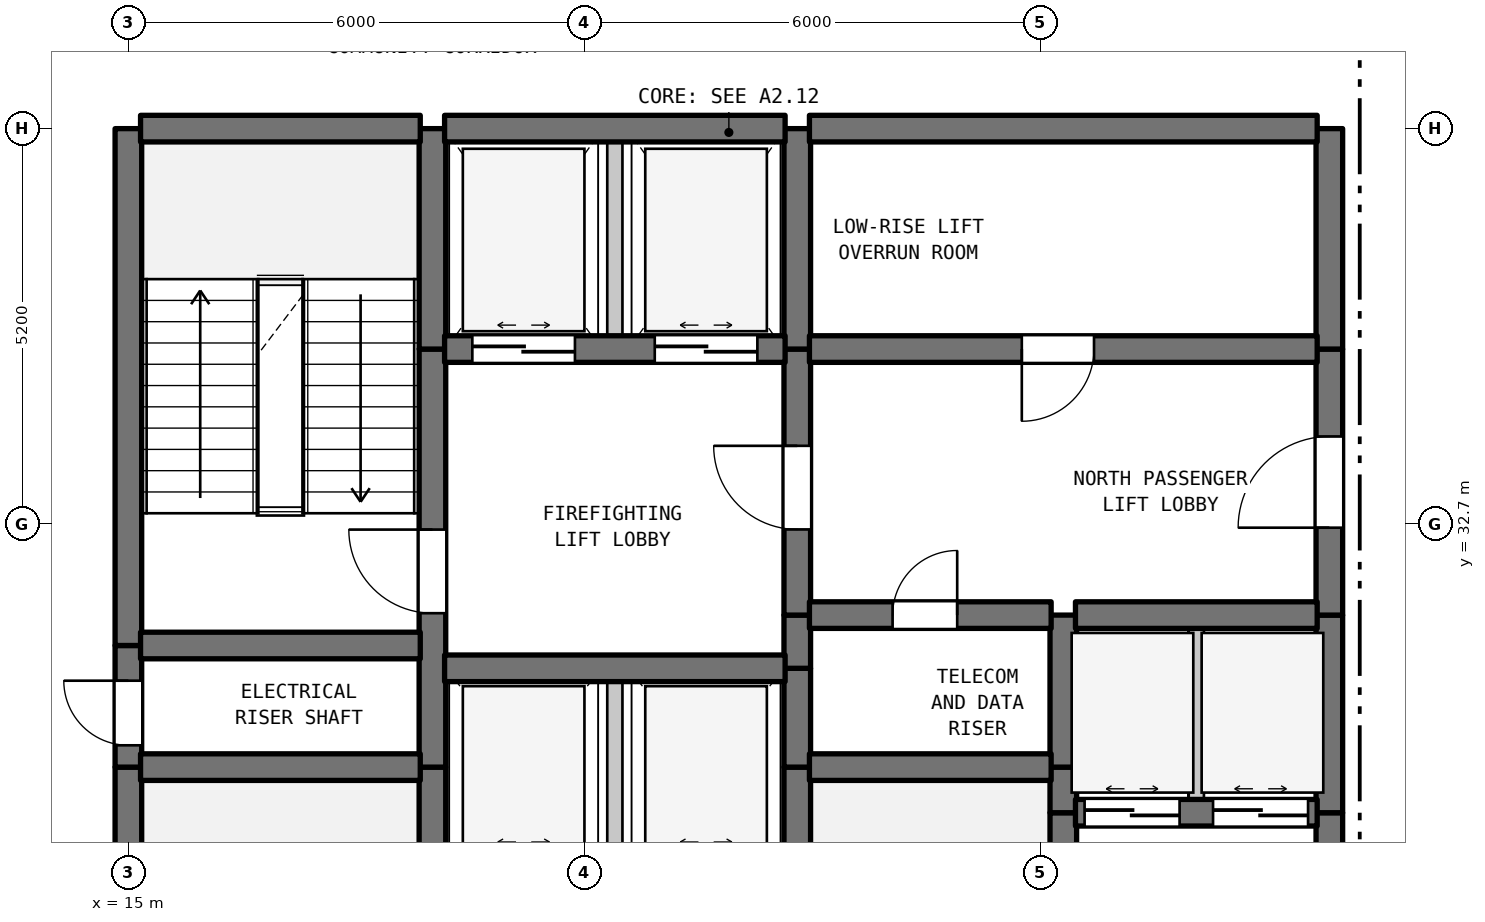
"""IFC4 building model, lengths in metres.
Left out: names, types, materials, properties, quantities, classifications, styles, units other than length and angle.
Written with IfcOpenShell. Run it as: python <this file> out.ifc"""

import sys

from ifc_helpers import new_model, si_unit, direction, frame, frame_2d, origin, place, context, subcontext, project, spatial, rectangle, extrude, element, fill, save


model = new_model("IFC4")
c1 = context("Model", 3, precision=1e-05, world=origin(), true_north=direction((0.0, 1.0)))
c2 = subcontext(c1, "Body", "Model", "MODEL_VIEW")
j1 = project(units=[si_unit("LENGTHUNIT", "METRE"), si_unit("PLANEANGLEUNIT", "RADIAN")], contexts=[c1])
p1 = place(None, origin())
s1 = spatial("IfcSite", under=j1, at=p1, CompositionType="ELEMENT")
p2 = place(p1, origin())
s2 = spatial("IfcBuilding", under=s1, at=p2, CompositionType="ELEMENT")
p3 = place(p2, frame((0.0, 0.0, 125.3)))
s3 = spatial("IfcBuildingStorey", under=s2, at=p3, CompositionType="ELEMENT", Elevation=125.3)
p4 = place(p3, frame((15.0, 22.7, 0.0), z_axis=(0.0, 0.0, 1.0), x_axis=(0.0, 1.0, 0.0)))
e1 = element("IfcWall", 1, at=p4, inside=s3, PredefinedType="SHEAR", context=c2, shape_type="SweptSolid", body=[
    extrude(rectangle(XDim=6.8, YDim=0.35, at=frame_2d((3.4, 0.0))), origin(), (0.0, 0.0, 1.0), 4.185),
])
p5 = place(p3, frame((15.0, 29.5, 0.0), z_axis=(0.0, 0.0, 1.0), x_axis=(0.0, 1.0, 0.0)))
e2 = element("IfcWall", 2, at=p5, inside=s3, PredefinedType="SHEAR", context=c2, shape_type="SweptSolid", body=[
    extrude(rectangle(XDim=1.6, YDim=0.35, at=frame_2d((0.8, 0.0))), origin(), (0.0, 0.0, 1.0), 4.185),
])
p6 = place(p5, frame((0.287, 0.0, 0.0)))
e3 = element("IfcOpeningElement", 3, at=p6, cuts=e2, PredefinedType="OPENING", context=c2, shape_type="SweptSolid", body=[
    extrude(rectangle(XDim=0.85, YDim=2.1, at=frame_2d((0.425, 1.05))), frame((0.0, 0.185, 0.0), z_axis=(0.0, -1.0, 0.0), x_axis=(1.0, 0.0, 0.0)), (0.0, 0.0, 1.0), 0.37),
])
p7 = place(p3, frame((15.0, 31.1, 0.0), z_axis=(0.0, 0.0, 1.0), x_axis=(0.0, 1.0, 0.0)))
e4 = element("IfcWall", 4, at=p7, inside=s3, PredefinedType="SHEAR", context=c2, shape_type="SweptSolid", body=[
    extrude(rectangle(XDim=6.8, YDim=0.35, at=frame_2d((3.4, 0.0))), origin(), (0.0, 0.0, 1.0), 4.185),
])
p8 = place(p3, frame((19.0, 28.2, 0.0), z_axis=(0.0, 0.0, 1.0), x_axis=(0.0, 1.0, 0.0)))
e5 = element("IfcWall", 5, at=p8, inside=s3, PredefinedType="SHEAR", context=c2, shape_type="SweptSolid", body=[
    extrude(rectangle(XDim=1.3, YDim=0.35, at=frame_2d((0.65, 0.0))), origin(), (0.0, 0.0, 1.0), 4.185),
])
p9 = place(p3, frame((19.0, 29.5, 0.0), z_axis=(0.0, 0.0, 1.0), x_axis=(0.0, 1.0, 0.0)))
e6 = element("IfcWall", 6, at=p9, inside=s3, PredefinedType="SHEAR", context=c2, shape_type="SweptSolid", body=[
    extrude(rectangle(XDim=5.5, YDim=0.35, at=frame_2d((2.75, 0.0))), origin(), (0.0, 0.0, 1.0), 4.185),
])
p10 = place(p9, frame((2.025, 0.0, 0.0)))
e7 = element("IfcOpeningElement", 7, at=p10, cuts=e6, PredefinedType="OPENING", context=c2, shape_type="SweptSolid", body=[
    extrude(rectangle(XDim=1.1, YDim=2.15, at=frame_2d((0.55, 1.075))), frame((0.0, 0.185, 0.0), z_axis=(0.0, -1.0, 0.0), x_axis=(1.0, 0.0, 0.0)), (0.0, 0.0, 1.0), 0.37),
])
p11 = place(p3, frame((19.0, 35.0, 0.0), z_axis=(0.0, 0.0, 1.0), x_axis=(0.0, 1.0, 0.0)))
e8 = element("IfcWall", 8, at=p11, inside=s3, PredefinedType="SHEAR", context=c2, shape_type="SweptSolid", body=[
    extrude(rectangle(XDim=2.9, YDim=0.35, at=frame_2d((1.45, 0.0))), origin(), (0.0, 0.0, 1.0), 4.185),
])
p12 = place(p3, frame((21.4, 28.2, 0.0), z_axis=(0.0, 0.0, 1.0), x_axis=(0.0, 1.0, 0.0)))
e9 = element("IfcWall", 9, at=p12, inside=s3, PredefinedType="STANDARD", context=c2, shape_type="SweptSolid", body=[
    extrude(rectangle(XDim=2.6, YDim=0.2, at=frame_2d((1.3, 0.0))), origin(), (0.0, 0.0, 1.0), 4.185),
])
p13 = place(p3, frame((21.4, 35.0, 0.0), z_axis=(0.0, 0.0, 1.0), x_axis=(0.0, 1.0, 0.0)))
e10 = element("IfcWall", 10, at=p13, inside=s3, PredefinedType="STANDARD", context=c2, shape_type="SweptSolid", body=[
    extrude(rectangle(XDim=2.9, YDim=0.2, at=frame_2d((1.45, 0.0))), origin(), (0.0, 0.0, 1.0), 4.185),
])
for number, where, z_axis, x_axis in (
    (11, (23.8, 28.2, 0.0), (0.0, 0.0, 1.0), (0.0, 1.0, 0.0)),
    (12, (23.8, 29.5, 0.0), (0.0, 0.0, 1.0), (0.0, 1.0, 0.0)),
):
    element("IfcWall", number, at=place(p3, frame(where, z_axis=z_axis, x_axis=x_axis)), inside=s3, PredefinedType="SHEAR", context=c2, shape_type="SweptSolid", body=[
        extrude(rectangle(XDim=1.3, YDim=0.35, at=frame_2d((0.65, 0.0))), origin(), (0.0, 0.0, 1.0), 4.185),
    ])
p14 = place(p3, frame((23.8, 30.8, 0.0), z_axis=(0.0, 0.0, 1.0), x_axis=(0.0, 1.0, 0.0)))
e13 = element("IfcWall", 13, at=p14, inside=s3, PredefinedType="SHEAR", context=c2, shape_type="SweptSolid", body=[
    extrude(rectangle(XDim=0.7, YDim=0.35, at=frame_2d((0.35, 0.0))), origin(), (0.0, 0.0, 1.0), 4.185),
])
p15 = place(p3, frame((23.8, 31.5, 0.0), z_axis=(0.0, 0.0, 1.0), x_axis=(0.0, 1.0, 0.0)))
e14 = element("IfcWall", 14, at=p15, inside=s3, PredefinedType="SHEAR", context=c2, shape_type="SweptSolid", body=[
    extrude(rectangle(XDim=3.5, YDim=0.35, at=frame_2d((1.75, 0.0))), origin(), (0.0, 0.0, 1.0), 4.185),
])
p16 = place(p15, frame((1.127, 0.0, 0.0)))
e15 = element("IfcOpeningElement", 15, at=p16, cuts=e14, PredefinedType="OPENING", context=c2, shape_type="SweptSolid", body=[
    extrude(rectangle(XDim=1.1, YDim=2.15, at=frame_2d((0.55, 1.075))), frame((0.0, 0.185, 0.0), z_axis=(0.0, -1.0, 0.0), x_axis=(1.0, 0.0, 0.0)), (0.0, 0.0, 1.0), 0.37),
])
p17 = place(p3, frame((23.8, 35.0, 0.0), z_axis=(0.0, 0.0, 1.0), x_axis=(0.0, 1.0, 0.0)))
e16 = element("IfcWall", 16, at=p17, inside=s3, PredefinedType="SHEAR", context=c2, shape_type="SweptSolid", body=[
    extrude(rectangle(XDim=2.9, YDim=0.35, at=frame_2d((1.45, 0.0))), origin(), (0.0, 0.0, 1.0), 4.185),
])
p18 = place(p3, frame((27.3, 25.6, 0.0), z_axis=(0.0, 0.0, 1.0), x_axis=(0.0, 1.0, 0.0)))
e17 = element("IfcWall", 17, at=p18, inside=s3, PredefinedType="SHEAR", context=c2, shape_type="SweptSolid", body=[
    extrude(rectangle(XDim=3.3, YDim=0.35, at=frame_2d((1.65, 0.0))), origin(), (0.0, 0.0, 1.0), 4.185),
])
p19 = place(p3, frame((27.3, 28.9, 0.0), z_axis=(0.0, 0.0, 1.0), x_axis=(0.0, 1.0, 0.0)))
e18 = element("IfcWall", 18, at=p19, inside=s3, PredefinedType="SHEAR", context=c2, shape_type="SweptSolid", body=[
    extrude(rectangle(XDim=0.6, YDim=0.35, at=frame_2d((0.3, 0.0))), origin(), (0.0, 0.0, 1.0), 4.185),
])
p20 = place(p3, frame((27.3, 29.5, 0.0), z_axis=(0.0, 0.0, 1.0), x_axis=(0.0, 1.0, 0.0)))
e19 = element("IfcWall", 19, at=p20, inside=s3, PredefinedType="SHEAR", context=c2, shape_type="SweptSolid", body=[
    extrude(rectangle(XDim=2.0, YDim=0.35, at=frame_2d((1.0, 0.0))), origin(), (0.0, 0.0, 1.0), 4.185),
])
p21 = place(p3, frame((29.05, 28.9, 0.0), z_axis=(0.0, 0.0, 1.0), x_axis=(0.0, 1.0, 0.0)))
e20 = element("IfcWall", 20, at=p21, inside=s3, PredefinedType="STANDARD", context=c2, shape_type="SweptSolid", body=[
    extrude(rectangle(XDim=2.6, YDim=0.2, at=frame_2d((1.3, 0.0))), origin(), (0.0, 0.0, 1.0), 4.185),
])
p22 = place(p3, frame((30.8, 25.6, 0.0), z_axis=(0.0, 0.0, 1.0), x_axis=(0.0, 1.0, 0.0)))
e21 = element("IfcWall", 21, at=p22, inside=s3, PredefinedType="SHEAR", context=c2, shape_type="SweptSolid", body=[
    extrude(rectangle(XDim=3.3, YDim=0.35, at=frame_2d((1.65, 0.0))), origin(), (0.0, 0.0, 1.0), 4.185),
])
p23 = place(p22, frame((0.978, 0.0, 0.0)))
e22 = element("IfcOpeningElement", 22, at=p23, cuts=e21, PredefinedType="OPENING", context=c2, shape_type="SweptSolid", body=[
    extrude(rectangle(XDim=1.2, YDim=2.2, at=frame_2d((0.6, 1.1))), frame((0.0, 0.185, 0.0), z_axis=(0.0, -1.0, 0.0), x_axis=(1.0, 0.0, 0.0)), (0.0, 0.0, 1.0), 0.37),
])
p24 = place(p3, frame((30.8, 28.9, 0.0), z_axis=(0.0, 0.0, 1.0), x_axis=(0.0, 1.0, 0.0)))
e23 = element("IfcWall", 23, at=p24, inside=s3, PredefinedType="SHEAR", context=c2, shape_type="SweptSolid", body=[
    extrude(rectangle(XDim=2.6, YDim=0.35, at=frame_2d((1.3, 0.0))), origin(), (0.0, 0.0, 1.0), 4.185),
])
p25 = place(p3, frame((30.8, 31.5, 0.0), z_axis=(0.0, 0.0, 1.0), x_axis=(0.0, 1.0, 0.0)))
e24 = element("IfcWall", 24, at=p25, inside=s3, PredefinedType="SHEAR", context=c2, shape_type="SweptSolid", body=[
    extrude(rectangle(XDim=3.5, YDim=0.35, at=frame_2d((1.75, 0.0))), origin(), (0.0, 0.0, 1.0), 4.185),
])
p26 = place(p25, frame((1.15, 0.0, 0.0)))
e25 = element("IfcOpeningElement", 25, at=p26, cuts=e24, PredefinedType="OPENING", context=c2, shape_type="SweptSolid", body=[
    extrude(rectangle(XDim=1.2, YDim=2.2, at=frame_2d((0.6, 1.1))), frame((0.0, 0.185, 0.0), z_axis=(0.0, -1.0, 0.0), x_axis=(1.0, 0.0, 0.0)), (0.0, 0.0, 1.0), 0.37),
])
p27 = place(p3, frame((30.8, 35.0, 0.0), z_axis=(0.0, 0.0, 1.0), x_axis=(0.0, 1.0, 0.0)))
e26 = element("IfcWall", 26, at=p27, inside=s3, PredefinedType="SHEAR", context=c2, shape_type="SweptSolid", body=[
    extrude(rectangle(XDim=2.9, YDim=0.35, at=frame_2d((1.45, 0.0))), origin(), (0.0, 0.0, 1.0), 4.185),
])
p28 = place(p3, frame((27.46, 28.9, 0.0), z_axis=(0.0, 0.0, 1.0), x_axis=(1.0, 0.0, 0.0)))
e27 = element("IfcWall", 27, at=p28, inside=s3, PredefinedType="SHEAR", context=c2, shape_type="SweptSolid", body=[
    extrude(rectangle(XDim=3.18, YDim=0.35, at=frame_2d((1.59, 0.0))), origin(), (0.0, 0.0, 1.0), 4.185),
])
p29 = place(p28, frame((0.12, 0.0, 0.0)))
e28 = element("IfcOpeningElement", 28, at=p29, cuts=e27, PredefinedType="OPENING", context=c2, shape_type="SweptSolid", body=[
    extrude(rectangle(XDim=1.25, YDim=2.2, at=frame_2d((0.625, 1.1))), frame((0.0, 0.185, 0.0), z_axis=(0.0, -1.0, 0.0), x_axis=(1.0, 0.0, 0.0)), (0.0, 0.0, 1.0), 0.37),
])
p30 = place(p28, frame((1.81, 0.0, 0.0)))
e29 = element("IfcOpeningElement", 29, at=p30, cuts=e27, PredefinedType="OPENING", context=c2, shape_type="SweptSolid", body=[
    extrude(rectangle(XDim=1.25, YDim=2.2, at=frame_2d((0.625, 1.1))), frame((0.0, 0.185, 0.0), z_axis=(0.0, -1.0, 0.0), x_axis=(1.0, 0.0, 0.0)), (0.0, 0.0, 1.0), 0.37),
])
p31 = place(p3, frame((15.16, 29.5, 0.0), z_axis=(0.0, 0.0, 1.0), x_axis=(1.0, 0.0, 0.0)))
e30 = element("IfcWall", 30, at=p31, inside=s3, PredefinedType="SHEAR", context=c2, shape_type="SweptSolid", body=[
    extrude(rectangle(XDim=3.68, YDim=0.35, at=frame_2d((1.84, 0.0))), origin(), (0.0, 0.0, 1.0), 4.185),
])
p32 = place(p3, frame((23.96, 29.5, 0.0), z_axis=(0.0, 0.0, 1.0), x_axis=(1.0, 0.0, 0.0)))
e31 = element("IfcWall", 31, at=p32, inside=s3, PredefinedType="SHEAR", context=c2, shape_type="SweptSolid", body=[
    extrude(rectangle(XDim=3.18, YDim=0.35, at=frame_2d((1.59, 0.0))), origin(), (0.0, 0.0, 1.0), 4.185),
])
p33 = place(p3, frame((19.16, 30.8, 0.0), z_axis=(0.0, 0.0, 1.0), x_axis=(1.0, 0.0, 0.0)))
e32 = element("IfcWall", 32, at=p33, inside=s3, PredefinedType="SHEAR", context=c2, shape_type="SweptSolid", body=[
    extrude(rectangle(XDim=4.48, YDim=0.35, at=frame_2d((2.24, 0.0))), origin(), (0.0, 0.0, 1.0), 4.185),
])
p34 = place(p3, frame((15.16, 31.1, 0.0), z_axis=(0.0, 0.0, 1.0), x_axis=(1.0, 0.0, 0.0)))
e33 = element("IfcWall", 33, at=p34, inside=s3, PredefinedType="SHEAR", context=c2, shape_type="SweptSolid", body=[
    extrude(rectangle(XDim=3.68, YDim=0.35, at=frame_2d((1.84, 0.0))), origin(), (0.0, 0.0, 1.0), 4.185),
])
p35 = place(p3, frame((23.96, 31.5, 0.0), z_axis=(0.0, 0.0, 1.0), x_axis=(1.0, 0.0, 0.0)))
e34 = element("IfcWall", 34, at=p35, inside=s3, PredefinedType="SHEAR", context=c2, shape_type="SweptSolid", body=[
    extrude(rectangle(XDim=3.18, YDim=0.35, at=frame_2d((1.59, 0.0))), origin(), (0.0, 0.0, 1.0), 4.185),
])
p36 = place(p35, frame((1.094, 0.0, 0.0)))
e35 = element("IfcOpeningElement", 35, at=p36, cuts=e34, PredefinedType="OPENING", context=c2, shape_type="SweptSolid", body=[
    extrude(rectangle(XDim=0.85, YDim=2.1, at=frame_2d((0.425, 1.05))), frame((0.0, 0.185, 0.0), z_axis=(0.0, -1.0, 0.0), x_axis=(1.0, 0.0, 0.0)), (0.0, 0.0, 1.0), 0.37),
])
p37 = place(p3, frame((27.46, 31.5, 0.0), z_axis=(0.0, 0.0, 1.0), x_axis=(1.0, 0.0, 0.0)))
e36 = element("IfcWall", 36, at=p37, inside=s3, PredefinedType="SHEAR", context=c2, shape_type="SweptSolid", body=[
    extrude(rectangle(XDim=3.18, YDim=0.35, at=frame_2d((1.59, 0.0))), origin(), (0.0, 0.0, 1.0), 4.185),
])
p38 = place(p3, frame((19.16, 35.0, 0.0), z_axis=(0.0, 0.0, 1.0), x_axis=(1.0, 0.0, 0.0)))
e37 = element("IfcWall", 37, at=p38, inside=s3, PredefinedType="SHEAR", context=c2, shape_type="SweptSolid", body=[
    extrude(rectangle(XDim=4.48, YDim=0.35, at=frame_2d((2.24, 0.0))), origin(), (0.0, 0.0, 1.0), 4.185),
])
p39 = place(p38, frame((0.365, 0.0, 0.0)))
e38 = element("IfcOpeningElement", 38, at=p39, cuts=e37, PredefinedType="OPENING", context=c2, shape_type="SweptSolid", body=[
    extrude(rectangle(XDim=1.35, YDim=2.2, at=frame_2d((0.675, 1.1))), frame((0.0, 0.185, 0.0), z_axis=(0.0, -1.0, 0.0), x_axis=(1.0, 0.0, 0.0)), (0.0, 0.0, 1.0), 0.37),
])
p40 = place(p38, frame((2.765, 0.0, 0.0)))
e39 = element("IfcOpeningElement", 39, at=p40, cuts=e37, PredefinedType="OPENING", context=c2, shape_type="SweptSolid", body=[
    extrude(rectangle(XDim=1.35, YDim=2.2, at=frame_2d((0.675, 1.1))), frame((0.0, 0.185, 0.0), z_axis=(0.0, -1.0, 0.0), x_axis=(1.0, 0.0, 0.0)), (0.0, 0.0, 1.0), 0.37),
])
p41 = place(p3, frame((23.96, 35.0, 0.0), z_axis=(0.0, 0.0, 1.0), x_axis=(1.0, 0.0, 0.0)))
e40 = element("IfcWall", 40, at=p41, inside=s3, PredefinedType="SHEAR", context=c2, shape_type="SweptSolid", body=[
    extrude(rectangle(XDim=6.68, YDim=0.35, at=frame_2d((3.34, 0.0))), origin(), (0.0, 0.0, 1.0), 4.185),
])
p42 = place(p41, frame((2.794, 0.0, 0.0)))
e41 = element("IfcOpeningElement", 41, at=p42, cuts=e40, PredefinedType="OPENING", context=c2, shape_type="SweptSolid", body=[
    extrude(rectangle(XDim=0.95, YDim=2.15, at=frame_2d((0.475, 1.075))), frame((0.0, 0.185, 0.0), z_axis=(0.0, -1.0, 0.0), x_axis=(1.0, 0.0, 0.0)), (0.0, 0.0, 1.0), 0.37),
])
p43 = place(p3, frame((15.16, 37.9, 0.0), z_axis=(0.0, 0.0, 1.0), x_axis=(1.0, 0.0, 0.0)))
e42 = element("IfcWall", 42, at=p43, inside=s3, PredefinedType="SHEAR", context=c2, shape_type="SweptSolid", body=[
    extrude(rectangle(XDim=3.68, YDim=0.35, at=frame_2d((1.84, 0.0))), origin(), (0.0, 0.0, 1.0), 4.185),
])
p44 = place(p3, frame((19.16, 37.9, 0.0), z_axis=(0.0, 0.0, 1.0), x_axis=(1.0, 0.0, 0.0)))
e43 = element("IfcWall", 43, at=p44, inside=s3, PredefinedType="SHEAR", context=c2, shape_type="SweptSolid", body=[
    extrude(rectangle(XDim=4.48, YDim=0.35, at=frame_2d((2.24, 0.0))), origin(), (0.0, 0.0, 1.0), 4.185),
])
p45 = place(p3, frame((23.96, 37.9, 0.0), z_axis=(0.0, 0.0, 1.0), x_axis=(1.0, 0.0, 0.0)))
e44 = element("IfcWall", 44, at=p45, inside=s3, PredefinedType="SHEAR", context=c2, shape_type="SweptSolid", body=[
    extrude(rectangle(XDim=6.68, YDim=0.35, at=frame_2d((3.34, 0.0))), origin(), (0.0, 0.0, 1.0), 4.185),
])
p46 = place(p6, origin())
e45 = element("IfcDoor", 45, at=p46, inside=s3, OperationType="SINGLE_SWING_RIGHT", PredefinedType="DOOR", context=c2, shape_type="SweptSolid", body=[
    extrude(rectangle(XDim=0.85, YDim=2.1, at=frame_2d((0.425, 1.05))), frame((0.0, 0.025, 0.0), z_axis=(0.0, -1.0, 0.0), x_axis=(1.0, 0.0, 0.0)), (0.0, 0.0, 1.0), 0.05),
])
fill(e3, e45)
p47 = place(p10, origin())
e46 = element("IfcDoor", 46, at=p47, inside=s3, OperationType="SINGLE_SWING_RIGHT", PredefinedType="DOOR", context=c2, shape_type="SweptSolid", body=[
    extrude(rectangle(XDim=1.1, YDim=2.15, at=frame_2d((0.55, 1.075))), frame((0.0, 0.025, 0.0), z_axis=(0.0, -1.0, 0.0), x_axis=(1.0, 0.0, 0.0)), (0.0, 0.0, 1.0), 0.05),
])
fill(e7, e46)
p48 = place(p16, origin())
e47 = element("IfcDoor", 47, at=p48, inside=s3, OperationType="SINGLE_SWING_RIGHT", PredefinedType="DOOR", context=c2, shape_type="SweptSolid", body=[
    extrude(rectangle(XDim=1.1, YDim=2.15, at=frame_2d((0.55, 1.075))), frame((0.0, 0.025, 0.0), z_axis=(0.0, -1.0, 0.0), x_axis=(1.0, 0.0, 0.0)), (0.0, 0.0, 1.0), 0.05),
])
fill(e15, e47)
p49 = place(p26, origin())
e48 = element("IfcDoor", 48, at=p49, inside=s3, OperationType="SINGLE_SWING_LEFT", PredefinedType="DOOR", context=c2, shape_type="SweptSolid", body=[
    extrude(rectangle(XDim=1.2, YDim=2.2, at=frame_2d((0.6, 1.1))), frame((0.0, 0.025, 0.0), z_axis=(0.0, -1.0, 0.0), x_axis=(1.0, 0.0, 0.0)), (0.0, 0.0, 1.0), 0.05),
])
fill(e25, e48)
p50 = place(p29, origin())
e49 = element("IfcDoor", 49, at=p50, inside=s3, OperationType="DOUBLE_DOOR_SLIDING", PredefinedType="DOOR", context=c2, shape_type="SweptSolid", body=[
    extrude(rectangle(XDim=1.25, YDim=2.2, at=frame_2d((0.625, 1.1))), frame((0.0, 0.025, 0.0), z_axis=(0.0, -1.0, 0.0), x_axis=(1.0, 0.0, 0.0)), (0.0, 0.0, 1.0), 0.05),
])
fill(e28, e49)
p51 = place(p30, origin())
e50 = element("IfcDoor", 50, at=p51, inside=s3, OperationType="DOUBLE_DOOR_SLIDING", PredefinedType="DOOR", context=c2, shape_type="SweptSolid", body=[
    extrude(rectangle(XDim=1.25, YDim=2.2, at=frame_2d((0.625, 1.1))), frame((0.0, 0.025, 0.0), z_axis=(0.0, -1.0, 0.0), x_axis=(1.0, 0.0, 0.0)), (0.0, 0.0, 1.0), 0.05),
])
fill(e29, e50)
p52 = place(p36, origin())
e51 = element("IfcDoor", 51, at=p52, inside=s3, OperationType="SINGLE_SWING_RIGHT", PredefinedType="DOOR", context=c2, shape_type="SweptSolid", body=[
    extrude(rectangle(XDim=0.85, YDim=2.1, at=frame_2d((0.425, 1.05))), frame((0.0, 0.025, 0.0), z_axis=(0.0, -1.0, 0.0), x_axis=(1.0, 0.0, 0.0)), (0.0, 0.0, 1.0), 0.05),
])
fill(e35, e51)
p53 = place(p39, origin())
e52 = element("IfcDoor", 52, at=p53, inside=s3, OperationType="DOUBLE_DOOR_SLIDING", PredefinedType="DOOR", context=c2, shape_type="SweptSolid", body=[
    extrude(rectangle(XDim=1.35, YDim=2.2, at=frame_2d((0.675, 1.1))), frame((0.0, 0.025, 0.0), z_axis=(0.0, -1.0, 0.0), x_axis=(1.0, 0.0, 0.0)), (0.0, 0.0, 1.0), 0.05),
])
fill(e38, e52)
p54 = place(p40, origin())
e53 = element("IfcDoor", 53, at=p54, inside=s3, OperationType="DOUBLE_DOOR_SLIDING", PredefinedType="DOOR", context=c2, shape_type="SweptSolid", body=[
    extrude(rectangle(XDim=1.35, YDim=2.2, at=frame_2d((0.675, 1.1))), frame((0.0, 0.025, 0.0), z_axis=(0.0, -1.0, 0.0), x_axis=(1.0, 0.0, 0.0)), (0.0, 0.0, 1.0), 0.05),
])
fill(e39, e53)
p55 = place(p42, frame((0.95, 0.0, 0.0), z_axis=(0.0, 0.0, 1.0), x_axis=(-1.0, 0.0, 0.0)))
e54 = element("IfcDoor", 54, at=p55, inside=s3, OperationType="SINGLE_SWING_LEFT", PredefinedType="DOOR", context=c2, shape_type="SweptSolid", body=[
    extrude(rectangle(XDim=0.95, YDim=2.15, at=frame_2d((0.475, 1.075))), frame((0.0, 0.025, 0.0), z_axis=(0.0, -1.0, 0.0), x_axis=(1.0, 0.0, 0.0)), (0.0, 0.0, 1.0), 0.05),
])
fill(e41, e54)
save(model, sys.argv[1])
